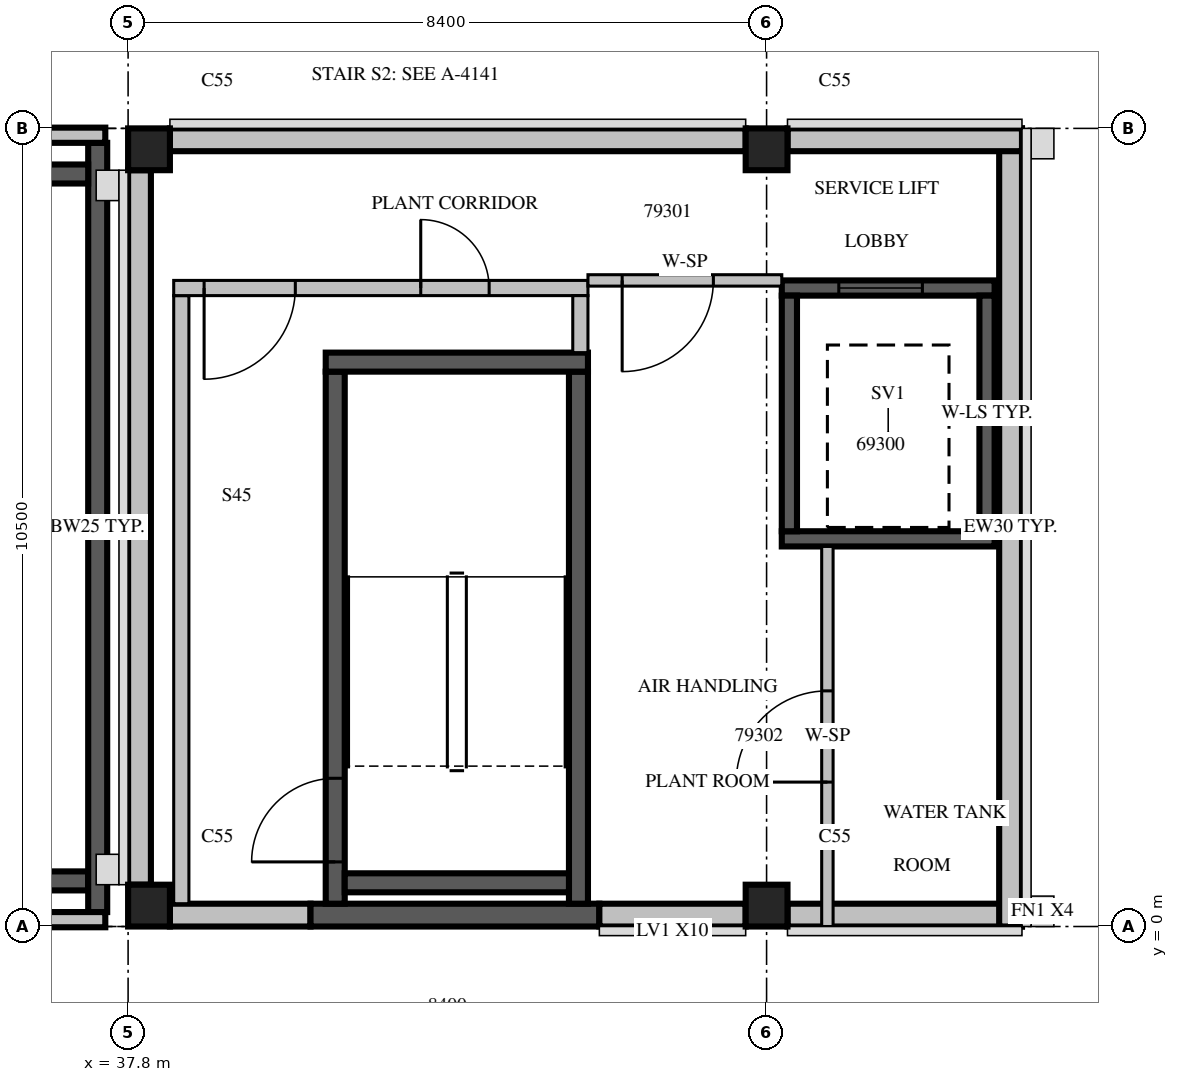
"""IFC4 building model, lengths in metres.
Left out: names, types, materials, properties, quantities, classifications, styles, units other than length and angle.
Written with IfcOpenShell. Run it as: python <this file> out.ifc"""

import sys

from ifc_helpers import new_model, si_unit, direction, frame, frame_2d, origin, origin_2d, place, context, subcontext, project, spatial, rectangle, extrude, source, transform, mapped, element, fill, save


model = new_model("IFC4")
c1 = context("Model", 3, precision=1e-05, world=origin(), true_north=direction((0.0, 1.0)))
c2 = subcontext(c1, "Body", "Model", "MODEL_VIEW")
j1 = project(units=[si_unit("LENGTHUNIT", "METRE"), si_unit("PLANEANGLEUNIT", "RADIAN")], contexts=[c1])
p1 = place(None, origin())
s1 = spatial("IfcSite", under=j1, at=p1, CompositionType="ELEMENT")
p2 = place(p1, origin())
s2 = spatial("IfcBuilding", under=s1, at=p2, CompositionType="ELEMENT")
p3 = place(p2, frame((0.0, 0.0, 376.5)))
s3 = spatial("IfcBuildingStorey", under=s2, at=p3, CompositionType="ELEMENT", Elevation=376.5)
m1 = source(origin(), c2, "Body", "SweptSolid", [
    extrude(rectangle(XDim=0.55, YDim=0.55, at=origin_2d()), origin(), (0.0, 0.0, 1.0), 4.0),
])
for number, where, z_axis, x_axis in (
    (1, (38.075, 0.275, 0.0), (0.0, 0.0, 1.0), (1.0, 0.0, 0.0)),
    (2, (46.2, 0.275, 0.0), (0.0, 0.0, 1.0), (1.0, 0.0, 0.0)),
    (3, (38.075, 10.225, 0.0), (0.0, 0.0, 1.0), (1.0, 0.0, 0.0)),
    (4, (46.2, 10.225, 0.0), (0.0, 0.0, 1.0), (1.0, 0.0, 0.0)),
):
    element("IfcColumn", number, at=place(p3, frame(where, z_axis=z_axis, x_axis=x_axis)), inside=s3, PredefinedType="COLUMN", context=c2, shape_type="MappedRepresentation", body=[
        mapped(m1, transform((0.0, 0.0, 0.0), scale=1.0)),
    ])
p4 = place(p3, frame((35.242, 0.6, 0.0), z_axis=(0.0, 0.0, 1.0), x_axis=(1.0, 0.0, 0.0)))
e5 = element("IfcWall", 5, at=p4, inside=s3, PredefinedType="SOLIDWALL", context=c2, shape_type="SweptSolid", body=[
    extrude(rectangle(XDim=2.033, YDim=0.25, at=frame_2d((1.016, 0.0))), origin(), (0.0, 0.0, 1.0), 3.55),
])
p5 = place(p3, frame((37.4, 0.19, 0.0), z_axis=(0.0, 0.0, 1.0), x_axis=(0.0, 1.0, 0.0)))
e6 = element("IfcWall", 6, at=p5, inside=s3, PredefinedType="SOLIDWALL", context=c2, shape_type="SweptSolid", body=[
    extrude(rectangle(XDim=10.12, YDim=0.25, at=frame_2d((5.06, 0.0))), origin(), (0.0, 0.0, 1.0), 3.55),
])
m2 = source(origin(), c2, "Body", "SweptSolid", [
    extrude(rectangle(XDim=2.033, YDim=0.25, at=frame_2d((1.016, 0.0))), origin(), (0.0, 0.0, 1.0), 3.55),
])
p6 = place(p3, frame((37.275, 9.9, 0.0), z_axis=(0.0, 0.0, 1.0), x_axis=(-1.0, 0.0, 0.0)))
e7 = element("IfcWall", 7, at=p6, inside=s3, PredefinedType="SOLIDWALL", context=c2, shape_type="MappedRepresentation", body=[
    mapped(m2, transform((0.0, 0.0, 0.0), scale=1.0)),
])
p7 = place(p3, frame((38.35, 0.15, 0.0), z_axis=(0.0, 0.0, 1.0), x_axis=(1.0, 0.0, 0.0)))
e8 = element("IfcWall", 8, at=p7, inside=s3, PredefinedType="STANDARD", context=c2, shape_type="SweptSolid", body=[
    extrude(rectangle(XDim=1.85, YDim=0.3, at=frame_2d((0.925, 0.0))), origin(), (0.0, 0.0, 1.0), 3.55),
])
m3 = source(origin(), c2, "Body", "SweptSolid", [
    extrude(rectangle(XDim=3.8, YDim=0.3, at=frame_2d((1.9, 0.0))), origin(), (0.0, 0.0, 1.0), 3.55),
])
p8 = place(p3, frame((40.2, 0.15, 0.0), z_axis=(0.0, 0.0, 1.0), x_axis=(1.0, 0.0, 0.0)))
e9 = element("IfcWall", 9, at=p8, inside=s3, PredefinedType="SOLIDWALL", context=c2, shape_type="MappedRepresentation", body=[
    mapped(m3, transform((0.0, 0.0, 0.0), scale=1.0)),
])
m4 = source(origin(), c2, "Body", "SweptSolid", [
    extrude(rectangle(XDim=1.925, YDim=0.3, at=frame_2d((0.963, 0.0))), origin(), (0.0, 0.0, 1.0), 3.55),
])
p9 = place(p3, frame((44.0, 0.15, 0.0), z_axis=(0.0, 0.0, 1.0), x_axis=(1.0, 0.0, 0.0)))
e10 = element("IfcWall", 10, at=p9, inside=s3, PredefinedType="STANDARD", context=c2, shape_type="MappedRepresentation", body=[
    mapped(m4, transform((0.0, 0.0, 0.0), scale=1.0)),
])
m5 = source(origin(), c2, "Body", "SweptSolid", [
    extrude(rectangle(XDim=3.085, YDim=0.3, at=frame_2d((1.542, 0.0))), origin(), (0.0, 0.0, 1.0), 3.55),
])
p10 = place(p3, frame((46.475, 0.15, 0.0), z_axis=(0.0, 0.0, 1.0), x_axis=(1.0, 0.0, 0.0)))
e11 = element("IfcWall", 11, at=p10, inside=s3, PredefinedType="STANDARD", context=c2, shape_type="MappedRepresentation", body=[
    mapped(m5, transform((0.0, 0.0, 0.0), scale=1.0)),
])
m6 = source(origin(), c2, "Body", "SweptSolid", [
    extrude(rectangle(XDim=10.5, YDim=0.3, at=frame_2d((5.25, 0.0))), origin(), (0.0, 0.0, 1.0), 3.55),
])
p11 = place(p3, frame((49.41, 0.0, 0.0), z_axis=(0.0, 0.0, 1.0), x_axis=(0.0, 1.0, 0.0)))
e12 = element("IfcWall", 12, at=p11, inside=s3, PredefinedType="STANDARD", context=c2, shape_type="MappedRepresentation", body=[
    mapped(m6, transform((0.0, 0.0, 0.0), scale=1.0)),
])
p12 = place(p3, frame((49.56, 10.35, 0.0), z_axis=(0.0, 0.0, 1.0), x_axis=(-1.0, 0.0, 0.0)))
e13 = element("IfcWall", 13, at=p12, inside=s3, PredefinedType="STANDARD", context=c2, shape_type="MappedRepresentation", body=[
    mapped(m5, transform((0.0, 0.0, 0.0), scale=1.0)),
])
m7 = source(origin(), c2, "Body", "SweptSolid", [
    extrude(rectangle(XDim=7.575, YDim=0.3, at=frame_2d((3.788, 0.0))), origin(), (0.0, 0.0, 1.0), 3.55),
])
p13 = place(p3, frame((45.925, 10.35, 0.0), z_axis=(0.0, 0.0, 1.0), x_axis=(-1.0, 0.0, 0.0)))
e14 = element("IfcWall", 14, at=p13, inside=s3, PredefinedType="STANDARD", context=c2, shape_type="MappedRepresentation", body=[
    mapped(m7, transform((0.0, 0.0, 0.0), scale=1.0)),
])
p14 = place(p3, frame((37.95, 9.95, 0.0), z_axis=(0.0, 0.0, 1.0), x_axis=(0.0, -1.0, 0.0)))
e15 = element("IfcWall", 15, at=p14, inside=s3, PredefinedType="STANDARD", context=c2, shape_type="SweptSolid", body=[
    extrude(rectangle(XDim=9.4, YDim=0.3, at=frame_2d((4.7, 0.0))), origin(), (0.0, 0.0, 1.0), 3.55),
])
p15 = place(p3, frame((37.5, 0.09, 0.0), z_axis=(0.0, 0.0, 1.0), x_axis=(-1.0, 0.0, 0.0)))
e16 = element("IfcWall", 16, at=p15, inside=s3, PredefinedType="PARAPET", context=c2, shape_type="SweptSolid", body=[
    extrude(rectangle(XDim=16.41, YDim=0.2, at=frame_2d((8.205, 0.0))), origin(), (0.0, 0.0, 1.0), 1.1),
])
p16 = place(p3, frame((21.95, 10.41, 0.0), z_axis=(0.0, 0.0, 1.0), x_axis=(1.0, 0.0, 0.0)))
e17 = element("IfcWall", 17, at=p16, inside=s3, PredefinedType="PARAPET", context=c2, shape_type="SweptSolid", body=[
    extrude(rectangle(XDim=15.55, YDim=0.2, at=frame_2d((7.775, 0.0))), origin(), (0.0, 0.0, 1.0), 1.1),
])
m8 = source(origin(), c2, "Body", "SweptSolid", [
    extrude(rectangle(XDim=2.8, YDim=0.2, at=frame_2d((1.4, 0.0))), origin(), (0.0, 0.0, 1.0), 4.0),
])
p17 = place(p3, frame((46.4, 5.1, 0.0), z_axis=(0.0, 0.0, 1.0), x_axis=(1.0, 0.0, 0.0)))
e18 = element("IfcWall", 18, at=p17, inside=s3, PredefinedType="SOLIDWALL", context=c2, shape_type="MappedRepresentation", body=[
    mapped(m8, transform((0.0, 0.0, 0.0), scale=1.0)),
])
p18 = place(p3, frame((46.4, 8.4, 0.0), z_axis=(0.0, 0.0, 1.0), x_axis=(1.0, 0.0, 0.0)))
e19 = element("IfcWall", 19, at=p18, inside=s3, PredefinedType="SOLIDWALL", context=c2, shape_type="MappedRepresentation", body=[
    mapped(m8, transform((0.0, 0.0, 0.0), scale=1.0)),
])
m9 = source(origin(), c2, "Body", "SweptSolid", [
    extrude(rectangle(XDim=1.1, YDim=2.1, at=frame_2d((0.55, 1.05))), frame((0.0, 0.11, 0.0), z_axis=(0.0, -1.0, 0.0), x_axis=(1.0, 0.0, 0.0)), (0.0, 0.0, 1.0), 0.22),
])
p19 = place(p18, frame((0.75, 0.0, 0.0)))
e20 = element("IfcOpeningElement", 20, at=p19, cuts=e19, PredefinedType="OPENING", context=c2, shape_type="MappedRepresentation", body=[
    mapped(m9, transform((0.0, 0.0, 0.0), scale=1.0)),
])
m10 = source(origin(), c2, "Body", "SweptSolid", [
    extrude(rectangle(XDim=3.1, YDim=0.2, at=frame_2d((1.55, 0.0))), origin(), (0.0, 0.0, 1.0), 4.0),
])
for number, where, z_axis, x_axis in (
    (21, (46.5, 5.2, 0.0), (0.0, 0.0, 1.0), (0.0, 1.0, 0.0)),
    (22, (49.1, 5.2, 0.0), (0.0, 0.0, 1.0), (0.0, 1.0, 0.0)),
):
    element("IfcWall", number, at=place(p3, frame(where, z_axis=z_axis, x_axis=x_axis)), inside=s3, PredefinedType="SOLIDWALL", context=c2, shape_type="MappedRepresentation", body=[
        mapped(m10, transform((0.0, 0.0, 0.0), scale=1.0)),
    ])
m11 = source(origin(), c2, "Body", "SweptSolid", [
    extrude(rectangle(XDim=7.0, YDim=0.25, at=frame_2d((3.5, 0.0))), origin(), (0.0, 0.0, 1.0), 3.55),
])
p20 = place(p3, frame((40.525, 0.3, 0.0), z_axis=(0.0, 0.0, 1.0), x_axis=(0.0, 1.0, 0.0)))
e23 = element("IfcWall", 23, at=p20, inside=s3, PredefinedType="SOLIDWALL", context=c2, shape_type="MappedRepresentation", body=[
    mapped(m11, transform((0.0, 0.0, 0.0), scale=1.0)),
])
m12 = source(origin(), c2, "Body", "SweptSolid", [
    extrude(rectangle(XDim=1.1, YDim=2.1, at=frame_2d((0.55, 1.05))), frame((0.0, 0.135, 0.0), z_axis=(0.0, -1.0, 0.0), x_axis=(1.0, 0.0, 0.0)), (0.0, 0.0, 1.0), 0.27),
])
p21 = place(p20, frame((0.55, 0.0, 0.0)))
e24 = element("IfcOpeningElement", 24, at=p21, cuts=e23, PredefinedType="OPENING", context=c2, shape_type="MappedRepresentation", body=[
    mapped(m12, transform((0.0, 0.0, 0.0), scale=1.0)),
])
p22 = place(p3, frame((43.725, 0.3, 0.0), z_axis=(0.0, 0.0, 1.0), x_axis=(0.0, 1.0, 0.0)))
e25 = element("IfcWall", 25, at=p22, inside=s3, PredefinedType="SOLIDWALL", context=c2, shape_type="MappedRepresentation", body=[
    mapped(m11, transform((0.0, 0.0, 0.0), scale=1.0)),
])
m13 = source(origin(), c2, "Body", "SweptSolid", [
    extrude(rectangle(XDim=3.45, YDim=0.25, at=frame_2d((1.725, 0.0))), origin(), (0.0, 0.0, 1.0), 3.55),
])
p23 = place(p3, frame((40.4, 7.425, 0.0), z_axis=(0.0, 0.0, 1.0), x_axis=(1.0, 0.0, 0.0)))
e26 = element("IfcWall", 26, at=p23, inside=s3, PredefinedType="SOLIDWALL", context=c2, shape_type="MappedRepresentation", body=[
    mapped(m13, transform((0.0, 0.0, 0.0), scale=1.0)),
])
m14 = source(origin(), c2, "Body", "SweptSolid", [
    extrude(rectangle(XDim=2.95, YDim=0.25, at=frame_2d((1.475, 0.0))), origin(), (0.0, 0.0, 1.0), 3.55),
])
p24 = place(p3, frame((40.65, 0.575, 0.0), z_axis=(0.0, 0.0, 1.0), x_axis=(1.0, 0.0, 0.0)))
e27 = element("IfcWall", 27, at=p24, inside=s3, PredefinedType="SOLIDWALL", context=c2, shape_type="MappedRepresentation", body=[
    mapped(m14, transform((0.0, 0.0, 0.0), scale=1.0)),
])
m15 = source(origin(), c2, "Body", "SweptSolid", [
    extrude(rectangle(XDim=8.0, YDim=0.2, at=frame_2d((4.0, 0.0))), origin(), (0.0, 0.0, 1.0), 3.55),
])
p25 = place(p3, frame((38.5, 0.3, 0.0), z_axis=(0.0, 0.0, 1.0), x_axis=(0.0, 1.0, 0.0)))
e28 = element("IfcWall", 28, at=p25, inside=s3, PredefinedType="PARTITIONING", context=c2, shape_type="MappedRepresentation", body=[
    mapped(m15, transform((0.0, 0.0, 0.0), scale=1.0)),
])
m16 = source(origin(), c2, "Body", "SweptSolid", [
    extrude(rectangle(XDim=5.45, YDim=0.2, at=frame_2d((2.725, 0.0))), origin(), (0.0, 0.0, 1.0), 3.55),
])
p26 = place(p3, frame((38.4, 8.4, 0.0), z_axis=(0.0, 0.0, 1.0), x_axis=(1.0, 0.0, 0.0)))
e29 = element("IfcWall", 29, at=p26, inside=s3, PredefinedType="PARTITIONING", context=c2, shape_type="MappedRepresentation", body=[
    mapped(m16, transform((0.0, 0.0, 0.0), scale=1.0)),
])
m17 = source(origin(), c2, "Body", "SweptSolid", [
    extrude(rectangle(XDim=1.2, YDim=2.1, at=frame_2d((0.6, 1.05))), frame((0.0, 0.11, 0.0), z_axis=(0.0, -1.0, 0.0), x_axis=(1.0, 0.0, 0.0)), (0.0, 0.0, 1.0), 0.22),
])
p27 = place(p26, frame((0.4, 0.0, 0.0)))
e30 = element("IfcOpeningElement", 30, at=p27, cuts=e29, PredefinedType="OPENING", context=c2, shape_type="MappedRepresentation", body=[
    mapped(m17, transform((0.0, 0.0, 0.0), scale=1.0)),
])
m18 = source(origin(), c2, "Body", "SweptSolid", [
    extrude(rectangle(XDim=0.9, YDim=2.1, at=frame_2d((0.45, 1.05))), frame((0.0, 0.11, 0.0), z_axis=(0.0, -1.0, 0.0), x_axis=(1.0, 0.0, 0.0)), (0.0, 0.0, 1.0), 0.22),
])
p28 = place(p26, frame((3.25, 0.0, 0.0)))
e31 = element("IfcOpeningElement", 31, at=p28, cuts=e29, PredefinedType="OPENING", context=c2, shape_type="MappedRepresentation", body=[
    mapped(m18, transform((0.0, 0.0, 0.0), scale=1.0)),
])
m19 = source(origin(), c2, "Body", "SweptSolid", [
    extrude(rectangle(XDim=0.75, YDim=0.2, at=frame_2d((0.375, 0.0))), origin(), (0.0, 0.0, 1.0), 3.55),
])
p29 = place(p3, frame((43.75, 7.55, 0.0), z_axis=(0.0, 0.0, 1.0), x_axis=(0.0, 1.0, 0.0)))
e32 = element("IfcWall", 32, at=p29, inside=s3, PredefinedType="PARTITIONING", context=c2, shape_type="MappedRepresentation", body=[
    mapped(m19, transform((0.0, 0.0, 0.0), scale=1.0)),
])
m20 = source(origin(), c2, "Body", "SweptSolid", [
    extrude(rectangle(XDim=2.55, YDim=0.15, at=frame_2d((1.275, 0.0))), origin(), (0.0, 0.0, 1.0), 3.55),
])
p30 = place(p3, frame((43.85, 8.5, 0.0), z_axis=(0.0, 0.0, 1.0), x_axis=(1.0, 0.0, 0.0)))
e33 = element("IfcWall", 33, at=p30, inside=s3, PredefinedType="PARTITIONING", context=c2, shape_type="MappedRepresentation", body=[
    mapped(m20, transform((0.0, 0.0, 0.0), scale=1.0)),
])
m21 = source(origin(), c2, "Body", "SweptSolid", [
    extrude(rectangle(XDim=1.2, YDim=2.1, at=frame_2d((0.6, 1.05))), frame((0.0, 0.085, 0.0), z_axis=(0.0, -1.0, 0.0), x_axis=(1.0, 0.0, 0.0)), (0.0, 0.0, 1.0), 0.17),
])
p31 = place(p30, frame((0.45, 0.0, 0.0)))
e34 = element("IfcOpeningElement", 34, at=p31, cuts=e33, PredefinedType="OPENING", context=c2, shape_type="MappedRepresentation", body=[
    mapped(m21, transform((0.0, 0.0, 0.0), scale=1.0)),
])
p32 = place(p3, frame((47.0, 0.0, 0.0), z_axis=(0.0, 0.0, 1.0), x_axis=(0.0, 1.0, 0.0)))
e35 = element("IfcWall", 35, at=p32, inside=s3, PredefinedType="PARTITIONING", context=c2, shape_type="SweptSolid", body=[
    extrude(rectangle(XDim=5.0, YDim=0.15, at=frame_2d((2.5, 0.0))), origin(), (0.0, 0.0, 1.0), 3.55),
])
p33 = place(p32, frame((1.9, 0.0, 0.0)))
e36 = element("IfcOpeningElement", 36, at=p33, cuts=e35, PredefinedType="OPENING", context=c2, shape_type="MappedRepresentation", body=[
    mapped(m21, transform((0.0, 0.0, 0.0), scale=1.0)),
])
m22 = source(origin(), c2, "Body", "SweptSolid", [
    extrude(rectangle(XDim=1.1, YDim=2.1, at=frame_2d((0.55, 1.05))), frame((0.0, 0.025, 0.0), z_axis=(0.0, -1.0, 0.0), x_axis=(1.0, 0.0, 0.0)), (0.0, 0.0, 1.0), 0.05),
])
p34 = place(p19, origin())
e37 = element("IfcDoor", 37, at=p34, inside=s3, OperationType="SLIDING_TO_LEFT", PredefinedType="DOOR", context=c2, shape_type="MappedRepresentation", body=[
    mapped(m22, transform((0.0, 0.0, 0.0), scale=1.0)),
])
fill(e20, e37)
p35 = place(p21, origin())
e38 = element("IfcDoor", 38, at=p35, inside=s3, OperationType="SINGLE_SWING_LEFT", PredefinedType="DOOR", context=c2, shape_type="MappedRepresentation", body=[
    mapped(m22, transform((0.0, 0.0, 0.0), scale=1.0)),
])
fill(e24, e38)
m23 = source(origin(), c2, "Body", "SweptSolid", [
    extrude(rectangle(XDim=1.2, YDim=2.1, at=frame_2d((0.6, 1.05))), frame((0.0, 0.025, 0.0), z_axis=(0.0, -1.0, 0.0), x_axis=(1.0, 0.0, 0.0)), (0.0, 0.0, 1.0), 0.05),
])
p36 = place(p27, origin())
e39 = element("IfcDoor", 39, at=p36, inside=s3, OperationType="SINGLE_SWING_RIGHT", PredefinedType="DOOR", context=c2, shape_type="MappedRepresentation", body=[
    mapped(m23, transform((0.0, 0.0, 0.0), scale=1.0)),
])
fill(e30, e39)
m24 = source(origin(), c2, "Body", "SweptSolid", [
    extrude(rectangle(XDim=0.9, YDim=2.1, at=frame_2d((0.45, 1.05))), frame((0.0, 0.025, 0.0), z_axis=(0.0, -1.0, 0.0), x_axis=(1.0, 0.0, 0.0)), (0.0, 0.0, 1.0), 0.05),
])
p37 = place(p28, origin())
e40 = element("IfcDoor", 40, at=p37, inside=s3, OperationType="SINGLE_SWING_LEFT", PredefinedType="DOOR", context=c2, shape_type="MappedRepresentation", body=[
    mapped(m24, transform((0.0, 0.0, 0.0), scale=1.0)),
])
fill(e31, e40)
p38 = place(p31, origin())
e41 = element("IfcDoor", 41, at=p38, inside=s3, OperationType="SINGLE_SWING_RIGHT", PredefinedType="DOOR", context=c2, shape_type="MappedRepresentation", body=[
    mapped(m23, transform((0.0, 0.0, 0.0), scale=1.0)),
])
fill(e34, e41)
p39 = place(p33, origin())
e42 = element("IfcDoor", 42, at=p39, inside=s3, OperationType="SINGLE_SWING_LEFT", PredefinedType="DOOR", context=c2, shape_type="MappedRepresentation", body=[
    mapped(m23, transform((0.0, 0.0, 0.0), scale=1.0)),
])
fill(e36, e42)
save(model, sys.argv[1])
